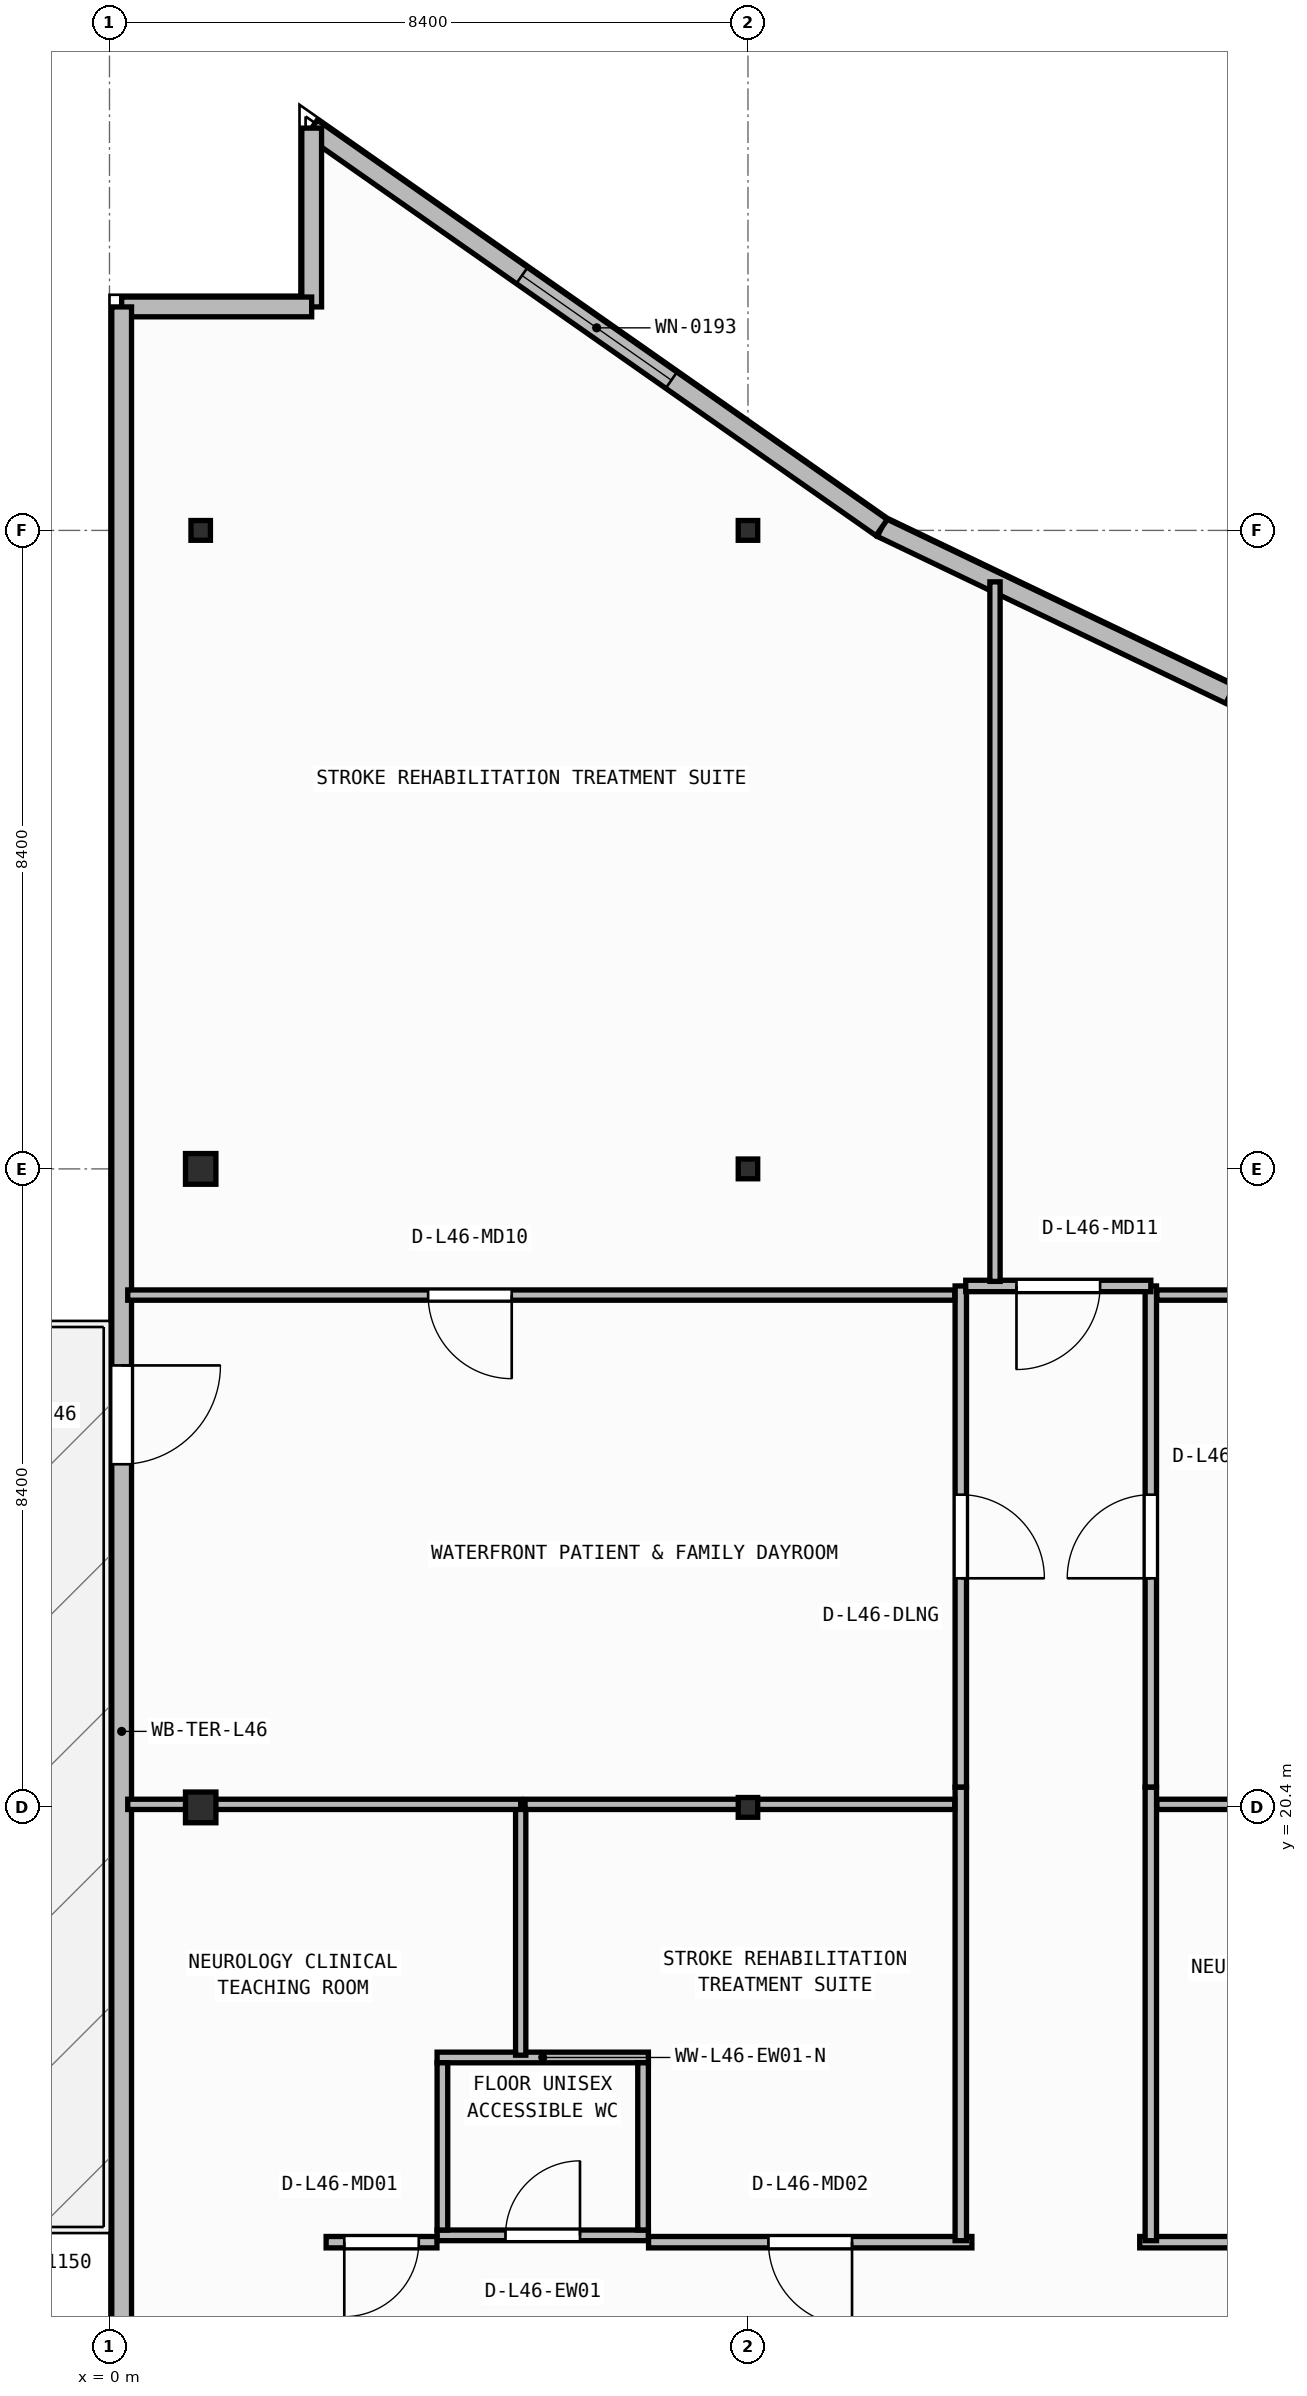
"""IFC4 building model, lengths in metres.
Left out: names, types, materials, properties, quantities, classifications, styles, units other than length and angle.
Written with IfcOpenShell. Run it as: python <this file> out.ifc"""

import sys

from ifc_helpers import new_model, si_unit, direction, frame, frame_2d, origin, origin_2d, place, context, subcontext, project, spatial, rectangle, i_section, extrude, element, fill, save


model = new_model("IFC4")
c1 = context("Model", 3, precision=1e-05, world=origin(), true_north=direction((0.0, 1.0)))
c2 = subcontext(c1, "Body", "Model", "MODEL_VIEW")
j1 = project(units=[si_unit("LENGTHUNIT", "METRE"), si_unit("PLANEANGLEUNIT", "RADIAN")], contexts=[c1])
p1 = place(None, origin())
s1 = spatial("IfcSite", under=j1, at=p1, CompositionType="ELEMENT")
p2 = place(p1, origin())
s2 = spatial("IfcBuilding", under=s1, at=p2, CompositionType="ELEMENT")
p3 = place(p2, frame((0.0, 0.0, 188.15)))
s3 = spatial("IfcBuildingStorey", under=s2, at=p3, CompositionType="ELEMENT", Elevation=188.15)
p4 = place(p3, frame((1.2, 20.4, 0.0), z_axis=(0.0, 0.0, 1.0), x_axis=(1.0, 0.0, 0.0)))
e1 = element("IfcColumn", 1, at=p4, inside=s3, PredefinedType="COLUMN", context=c2, shape_type="SweptSolid", body=[
    extrude(i_section(OverallWidth=0.4, OverallDepth=0.404, WebThickness=0.02, FlangeThickness=0.032, at=origin_2d()), origin(), (0.0, 0.0, 1.0), 3.95),
])
p5 = place(p3, frame((8.4, 20.4, 0.0), z_axis=(0.0, 0.0, 1.0), x_axis=(1.0, 0.0, 0.0)))
e2 = element("IfcColumn", 2, at=p5, inside=s3, PredefinedType="COLUMN", context=c2, shape_type="SweptSolid", body=[
    extrude(i_section(OverallWidth=0.256, OverallDepth=0.26, WebThickness=0.01, FlangeThickness=0.017, FilletRadius=0.013, at=origin_2d()), origin(), (0.0, 0.0, 1.0), 3.95),
])
p6 = place(p3, frame((1.2, 28.8, 0.0), z_axis=(0.0, 0.0, 1.0), x_axis=(1.0, 0.0, 0.0)))
e3 = element("IfcColumn", 3, at=p6, inside=s3, PredefinedType="COLUMN", context=c2, shape_type="SweptSolid", body=[
    extrude(i_section(OverallWidth=0.4, OverallDepth=0.404, WebThickness=0.02, FlangeThickness=0.032, at=origin_2d()), origin(), (0.0, 0.0, 1.0), 3.95),
])
for number, where, z_axis, x_axis in (
    (4, (8.4, 28.8, 0.0), (0.0, 0.0, 1.0), (1.0, 0.0, 0.0)),
    (5, (1.2, 37.2, 0.0), (0.0, 0.0, 1.0), (1.0, 0.0, 0.0)),
    (6, (8.4, 37.2, 0.0), (0.0, 0.0, 1.0), (1.0, 0.0, 0.0)),
):
    element("IfcColumn", number, at=place(p3, frame(where, z_axis=z_axis, x_axis=x_axis)), inside=s3, PredefinedType="COLUMN", context=c2, shape_type="SweptSolid", body=[
        extrude(i_section(OverallWidth=0.256, OverallDepth=0.26, WebThickness=0.01, FlangeThickness=0.017, FilletRadius=0.013, at=origin_2d()), origin(), (0.0, 0.0, 1.0), 3.95),
    ])
p7 = place(p3, frame((21.461, 31.823, 0.0), z_axis=(0.0, 0.0, 1.0), x_axis=(-0.901858094827, 0.432032379336, 0.0)))
e7 = element("IfcWall", 7, at=p7, inside=s3, PredefinedType="STANDARD", context=c2, shape_type="SweptSolid", body=[
    extrude(rectangle(XDim=12.532, YDim=0.26, at=frame_2d((6.266, 0.0))), origin(), (0.0, 0.0, 1.0), 3.71),
])
p8 = place(p7, frame((5.066, 0.0, 0.9)))
e8 = element("IfcOpeningElement", 8, at=p8, cuts=e7, PredefinedType="OPENING", context=c2, shape_type="SweptSolid", body=[
    extrude(rectangle(XDim=2.4, YDim=1.65, at=frame_2d((1.2, 0.825))), frame((0.0, 0.14, 0.0), z_axis=(0.0, -1.0, 0.0), x_axis=(1.0, 0.0, 0.0)), (0.0, 0.0, 1.0), 0.28),
])
p9 = place(p3, frame((10.159, 37.237, 0.0), z_axis=(0.0, 0.0, 1.0), x_axis=(-0.818933702389, 0.57388813465, 0.0)))
e9 = element("IfcWall", 9, at=p9, inside=s3, PredefinedType="STANDARD", context=c2, shape_type="SweptSolid", body=[
    extrude(rectangle(XDim=9.157, YDim=0.26, at=frame_2d((4.579, 0.0))), origin(), (0.0, 0.0, 1.0), 3.71),
])
p10 = place(p9, frame((3.378, 0.0, 0.9)))
e10 = element("IfcOpeningElement", 10, at=p10, cuts=e9, PredefinedType="OPENING", context=c2, shape_type="SweptSolid", body=[
    extrude(rectangle(XDim=2.4, YDim=1.65, at=frame_2d((1.2, 0.825))), frame((0.0, 0.14, 0.0), z_axis=(0.0, -1.0, 0.0), x_axis=(1.0, 0.0, 0.0)), (0.0, 0.0, 1.0), 0.28),
])
p11 = place(p3, frame((2.66, 42.492, 0.0), z_axis=(0.0, 0.0, 1.0), x_axis=(0.0, -1.0, 0.0)))
e11 = element("IfcWall", 11, at=p11, inside=s3, PredefinedType="STANDARD", context=c2, shape_type="SweptSolid", body=[
    extrude(rectangle(XDim=2.353, YDim=0.26, at=frame_2d((1.176, 0.0))), origin(), (0.0, 0.0, 1.0), 3.71),
])
p12 = place(p3, frame((2.66, 40.14, 0.0), z_axis=(0.0, 0.0, 1.0), x_axis=(-1.0, 0.0, 0.0)))
e12 = element("IfcWall", 12, at=p12, inside=s3, PredefinedType="STANDARD", context=c2, shape_type="SweptSolid", body=[
    extrude(rectangle(XDim=2.5, YDim=0.26, at=frame_2d((1.25, 0.0))), origin(), (0.0, 0.0, 1.0), 3.71),
])
p13 = place(p3, frame((0.16, 40.14, 0.0), z_axis=(0.0, 0.0, 1.0), x_axis=(0.0, -1.0, 0.0)))
e13 = element("IfcWall", 13, at=p13, inside=s3, PredefinedType="STANDARD", context=c2, shape_type="SweptSolid", body=[
    extrude(rectangle(XDim=37.48, YDim=0.26, at=frame_2d((18.74, 0.0))), origin(), (0.0, 0.0, 1.0), 3.71),
])
p14 = place(p13, frame((13.926, 0.0, 0.0)))
e14 = element("IfcOpeningElement", 14, at=p14, cuts=e13, PredefinedType="OPENING", context=c2, shape_type="SweptSolid", body=[
    extrude(rectangle(XDim=1.3, YDim=2.15, at=frame_2d((0.65, 1.075))), frame((0.0, 0.14, 0.0), z_axis=(0.0, -1.0, 0.0), x_axis=(1.0, 0.0, 0.0)), (0.0, 0.0, 1.0), 0.28),
])
p15 = place(p3, frame((4.31, 14.77, 0.0), z_axis=(0.0, 0.0, 1.0), x_axis=(1.0, 0.0, 0.0)))
e15 = element("IfcWall", 15, at=p15, inside=s3, PredefinedType="PARTITIONING", context=c2, shape_type="SweptSolid", body=[
    extrude(rectangle(XDim=2.78, YDim=0.14, at=frame_2d((1.39, 0.0))), origin(), (0.0, 0.0, 1.0), 3.71),
])
p16 = place(p15, frame((0.9, 0.0, 0.0)))
e16 = element("IfcOpeningElement", 16, at=p16, cuts=e15, PredefinedType="OPENING", context=c2, shape_type="SweptSolid", body=[
    extrude(rectangle(XDim=0.98, YDim=2.1, at=frame_2d((0.49, 1.05))), frame((0.0, 0.08, 0.0), z_axis=(0.0, -1.0, 0.0), x_axis=(1.0, 0.0, 0.0)), (0.0, 0.0, 1.0), 0.16),
])
p17 = place(p3, frame((4.31, 17.11, 0.0), z_axis=(0.0, 0.0, 1.0), x_axis=(1.0, 0.0, 0.0)))
e17 = element("IfcWall", 17, at=p17, inside=s3, PredefinedType="PARTITIONING", context=c2, shape_type="SweptSolid", body=[
    extrude(rectangle(XDim=2.78, YDim=0.14, at=frame_2d((1.39, 0.0))), origin(), (0.0, 0.0, 1.0), 3.71),
])
for number, where, z_axis, x_axis in (
    (18, (4.38, 14.84, 0.0), (0.0, 0.0, 1.0), (0.0, 1.0, 0.0)),
    (19, (7.02, 14.84, 0.0), (0.0, 0.0, 1.0), (0.0, 1.0, 0.0)),
):
    element("IfcWall", number, at=place(p3, frame(where, z_axis=z_axis, x_axis=x_axis)), inside=s3, PredefinedType="PARTITIONING", context=c2, shape_type="SweptSolid", body=[
        extrude(rectangle(XDim=2.2, YDim=0.14, at=frame_2d((1.1, 0.0))), origin(), (0.0, 0.0, 1.0), 3.71),
    ])
p18 = place(p3, frame((4.308, 14.68, 0.0), z_axis=(0.0, 0.0, 1.0), x_axis=(-1.0, 0.0, 0.0)))
e20 = element("IfcWall", 20, at=p18, inside=s3, PredefinedType="PARTITIONING", context=c2, shape_type="SweptSolid", body=[
    extrude(rectangle(XDim=1.458, YDim=0.15, at=frame_2d((0.729, 0.0))), origin(), (0.0, 0.0, 1.0), 3.71),
])
p19 = place(p18, frame((0.239, 0.0, 0.0)))
e21 = element("IfcOpeningElement", 21, at=p19, cuts=e20, PredefinedType="OPENING", context=c2, shape_type="SweptSolid", body=[
    extrude(rectangle(XDim=0.98, YDim=2.1, at=frame_2d((0.49, 1.05))), frame((0.0, 0.085, 0.0), z_axis=(0.0, -1.0, 0.0), x_axis=(1.0, 0.0, 0.0)), (0.0, 0.0, 1.0), 0.17),
])
p20 = place(p3, frame((11.346, 14.68, 0.0), z_axis=(0.0, 0.0, 1.0), x_axis=(-1.0, 0.0, 0.0)))
e22 = element("IfcWall", 22, at=p20, inside=s3, PredefinedType="PARTITIONING", context=c2, shape_type="SweptSolid", body=[
    extrude(rectangle(XDim=4.254, YDim=0.15, at=frame_2d((2.127, 0.0))), origin(), (0.0, 0.0, 1.0), 3.71),
])
p21 = place(p20, frame((1.577, 0.0, 0.0)))
e23 = element("IfcOpeningElement", 23, at=p21, cuts=e22, PredefinedType="OPENING", context=c2, shape_type="SweptSolid", body=[
    extrude(rectangle(XDim=1.1, YDim=2.1, at=frame_2d((0.55, 1.05))), frame((0.0, 0.085, 0.0), z_axis=(0.0, -1.0, 0.0), x_axis=(1.0, 0.0, 0.0)), (0.0, 0.0, 1.0), 0.17),
])
p22 = place(p3, frame((18.266, 14.68, 0.0), z_axis=(0.0, 0.0, 1.0), x_axis=(-1.0, 0.0, 0.0)))
e24 = element("IfcWall", 24, at=p22, inside=s3, PredefinedType="PARTITIONING", context=c2, shape_type="SweptSolid", body=[
    extrude(rectangle(XDim=4.712, YDim=0.15, at=frame_2d((2.356, 0.0))), origin(), (0.0, 0.0, 1.0), 3.71),
])
p23 = place(p22, frame((1.806, 0.0, 0.0)))
e25 = element("IfcOpeningElement", 25, at=p23, cuts=e24, PredefinedType="OPENING", context=c2, shape_type="SweptSolid", body=[
    extrude(rectangle(XDim=1.1, YDim=2.1, at=frame_2d((0.55, 1.05))), frame((0.0, 0.085, 0.0), z_axis=(0.0, -1.0, 0.0), x_axis=(1.0, 0.0, 0.0)), (0.0, 0.0, 1.0), 0.17),
])
for number, where, z_axis, x_axis in (
    (26, (11.2, 20.666, 0.0), (0.0, 0.0, 1.0), (0.0, -1.0, 0.0)),
    (27, (13.7, 14.7, 0.0), (0.0, 0.0, 1.0), (0.0, 1.0, 0.0)),
):
    element("IfcWall", number, at=place(p3, frame(where, z_axis=z_axis, x_axis=x_axis)), inside=s3, PredefinedType="PARTITIONING", context=c2, shape_type="SweptSolid", body=[
        extrude(rectangle(XDim=5.966, YDim=0.15, at=frame_2d((2.983, 0.0))), origin(), (0.0, 0.0, 1.0), 3.71),
    ])
p24 = place(p3, frame((11.2, 27.26, 0.0), z_axis=(0.0, 0.0, 1.0), x_axis=(0.0, -1.0, 0.0)))
e28 = element("IfcWall", 28, at=p24, inside=s3, PredefinedType="PARTITIONING", context=c2, shape_type="SweptSolid", body=[
    extrude(rectangle(XDim=6.592, YDim=0.15, at=frame_2d((3.296, 0.0))), origin(), (0.0, 0.0, 1.0), 3.71),
])
p25 = place(p24, frame((2.746, 0.0, 0.0)))
e29 = element("IfcOpeningElement", 29, at=p25, cuts=e28, PredefinedType="OPENING", context=c2, shape_type="SweptSolid", body=[
    extrude(rectangle(XDim=1.1, YDim=2.1, at=frame_2d((0.55, 1.05))), frame((0.0, 0.085, 0.0), z_axis=(0.0, -1.0, 0.0), x_axis=(1.0, 0.0, 0.0)), (0.0, 0.0, 1.0), 0.17),
])
p26 = place(p3, frame((13.7, 20.668, 0.0), z_axis=(0.0, 0.0, 1.0), x_axis=(0.0, 1.0, 0.0)))
e30 = element("IfcWall", 30, at=p26, inside=s3, PredefinedType="PARTITIONING", context=c2, shape_type="SweptSolid", body=[
    extrude(rectangle(XDim=6.592, YDim=0.15, at=frame_2d((3.296, 0.0))), origin(), (0.0, 0.0, 1.0), 3.71),
])
p27 = place(p26, frame((2.746, 0.0, 0.0)))
e31 = element("IfcOpeningElement", 31, at=p27, cuts=e30, PredefinedType="OPENING", context=c2, shape_type="SweptSolid", body=[
    extrude(rectangle(XDim=1.1, YDim=2.1, at=frame_2d((0.55, 1.05))), frame((0.0, 0.085, 0.0), z_axis=(0.0, -1.0, 0.0), x_axis=(1.0, 0.0, 0.0)), (0.0, 0.0, 1.0), 0.17),
])
p28 = place(p3, frame((13.7, 27.26, 0.0), z_axis=(0.0, 0.0, 1.0), x_axis=(-1.0, 0.0, 0.0)))
e32 = element("IfcWall", 32, at=p28, inside=s3, PredefinedType="PARTITIONING", context=c2, shape_type="SweptSolid", body=[
    extrude(rectangle(XDim=2.435, YDim=0.15, at=frame_2d((1.218, 0.0))), origin(), (0.0, 0.0, 1.0), 3.71),
])
p29 = place(p28, frame((0.667, 0.0, 0.0)))
e33 = element("IfcOpeningElement", 33, at=p29, cuts=e32, PredefinedType="OPENING", context=c2, shape_type="SweptSolid", body=[
    extrude(rectangle(XDim=1.1, YDim=2.1, at=frame_2d((0.55, 1.05))), frame((0.0, 0.085, 0.0), z_axis=(0.0, -1.0, 0.0), x_axis=(1.0, 0.0, 0.0)), (0.0, 0.0, 1.0), 0.17),
])
p30 = place(p3, frame((5.41, 17.14, 0.0), z_axis=(0.0, 0.0, 1.0), x_axis=(0.0, 1.0, 0.0)))
e34 = element("IfcWall", 34, at=p30, inside=s3, PredefinedType="PARTITIONING", context=c2, shape_type="SweptSolid", body=[
    extrude(rectangle(XDim=3.3, YDim=0.135, at=frame_2d((1.65, 0.0))), origin(), (0.0, 0.0, 1.0), 3.71),
])
p31 = place(p3, frame((5.41, 20.44, 0.0), z_axis=(0.0, 0.0, 1.0), x_axis=(-1.0, 0.0, 0.0)))
e35 = element("IfcWall", 35, at=p31, inside=s3, PredefinedType="PARTITIONING", context=c2, shape_type="SweptSolid", body=[
    extrude(rectangle(XDim=5.17, YDim=0.135, at=frame_2d((2.585, 0.0))), origin(), (0.0, 0.0, 1.0), 3.152),
])
p32 = place(p3, frame((11.12, 20.44, 0.0), z_axis=(0.0, 0.0, 1.0), x_axis=(-1.0, 0.0, 0.0)))
e36 = element("IfcWall", 36, at=p32, inside=s3, PredefinedType="PARTITIONING", context=c2, shape_type="SweptSolid", body=[
    extrude(rectangle(XDim=5.653, YDim=0.135, at=frame_2d((2.826, 0.0))), origin(), (0.0, 0.0, 1.0), 3.152),
])
p33 = place(p3, frame((18.04, 20.44, 0.0), z_axis=(0.0, 0.0, 1.0), x_axis=(-1.0, 0.0, 0.0)))
e37 = element("IfcWall", 37, at=p33, inside=s3, PredefinedType="PARTITIONING", context=c2, shape_type="SweptSolid", body=[
    extrude(rectangle(XDim=4.26, YDim=0.135, at=frame_2d((2.13, 0.0))), origin(), (0.0, 0.0, 1.0), 3.152),
])
p34 = place(p3, frame((11.12, 27.14, 0.0), z_axis=(0.0, 0.0, 1.0), x_axis=(-1.0, 0.0, 0.0)))
e38 = element("IfcWall", 38, at=p34, inside=s3, PredefinedType="PARTITIONING", context=c2, shape_type="SweptSolid", body=[
    extrude(rectangle(XDim=10.88, YDim=0.135, at=frame_2d((5.44, 0.0))), origin(), (0.0, 0.0, 1.0), 3.71),
])
p35 = place(p34, frame((5.828, 0.0, 0.0)))
e39 = element("IfcOpeningElement", 39, at=p35, cuts=e38, PredefinedType="OPENING", context=c2, shape_type="SweptSolid", body=[
    extrude(rectangle(XDim=1.1, YDim=2.1, at=frame_2d((0.55, 1.05))), frame((0.0, 0.077, 0.0), z_axis=(0.0, -1.0, 0.0), x_axis=(1.0, 0.0, 0.0)), (0.0, 0.0, 1.0), 0.155),
])
p36 = place(p3, frame((25.748, 27.14, 0.0), z_axis=(0.0, 0.0, 1.0), x_axis=(-1.0, 0.0, 0.0)))
e40 = element("IfcWall", 40, at=p36, inside=s3, PredefinedType="PARTITIONING", context=c2, shape_type="SweptSolid", body=[
    extrude(rectangle(XDim=11.968, YDim=0.135, at=frame_2d((5.984, 0.0))), origin(), (0.0, 0.0, 1.0), 3.71),
])
p37 = place(p3, frame((11.65, 27.32, 0.0), z_axis=(0.0, 0.0, 1.0), x_axis=(0.0, 1.0, 0.0)))
e41 = element("IfcWall", 41, at=p37, inside=s3, PredefinedType="PARTITIONING", context=c2, shape_type="SweptSolid", body=[
    extrude(rectangle(XDim=9.203, YDim=0.135, at=frame_2d((4.602, 0.0))), origin(), (0.0, 0.0, 1.0), 3.71),
])
p38 = place(p10, origin())
e42 = element("IfcWindow", 42, at=p38, inside=s3, PartitioningType="SINGLE_PANEL", PredefinedType="WINDOW", context=c2, shape_type="SweptSolid", body=[
    extrude(rectangle(XDim=2.4, YDim=1.65, at=frame_2d((1.2, 0.825))), frame((0.0, 0.03, 0.0), z_axis=(0.0, -1.0, 0.0), x_axis=(1.0, 0.0, 0.0)), (0.0, 0.0, 1.0), 0.06),
])
fill(e10, e42)
p39 = place(p14, origin())
e43 = element("IfcDoor", 43, at=p39, inside=s3, OperationType="SINGLE_SWING_LEFT", PredefinedType="DOOR", context=c2, shape_type="SweptSolid", body=[
    extrude(rectangle(XDim=1.3, YDim=2.15, at=frame_2d((0.65, 1.075))), frame((0.0, 0.025, 0.0), z_axis=(0.0, -1.0, 0.0), x_axis=(1.0, 0.0, 0.0)), (0.0, 0.0, 1.0), 0.05),
])
fill(e14, e43)
p40 = place(p16, origin())
e44 = element("IfcDoor", 44, at=p40, inside=s3, OperationType="SINGLE_SWING_RIGHT", PredefinedType="DOOR", context=c2, shape_type="SweptSolid", body=[
    extrude(rectangle(XDim=0.98, YDim=2.1, at=frame_2d((0.49, 1.05))), frame((0.0, 0.025, 0.0), z_axis=(0.0, -1.0, 0.0), x_axis=(1.0, 0.0, 0.0)), (0.0, 0.0, 1.0), 0.05),
])
fill(e16, e44)
p41 = place(p19, origin())
e45 = element("IfcDoor", 45, at=p41, inside=s3, OperationType="SINGLE_SWING_RIGHT", PredefinedType="DOOR", context=c2, shape_type="SweptSolid", body=[
    extrude(rectangle(XDim=0.98, YDim=2.1, at=frame_2d((0.49, 1.05))), frame((0.0, 0.025, 0.0), z_axis=(0.0, -1.0, 0.0), x_axis=(1.0, 0.0, 0.0)), (0.0, 0.0, 1.0), 0.05),
])
fill(e21, e45)
p42 = place(p21, origin())
e46 = element("IfcDoor", 46, at=p42, inside=s3, OperationType="SINGLE_SWING_LEFT", PredefinedType="DOOR", context=c2, shape_type="SweptSolid", body=[
    extrude(rectangle(XDim=1.1, YDim=2.1, at=frame_2d((0.55, 1.05))), frame((0.0, 0.025, 0.0), z_axis=(0.0, -1.0, 0.0), x_axis=(1.0, 0.0, 0.0)), (0.0, 0.0, 1.0), 0.05),
])
fill(e23, e46)
p43 = place(p25, origin())
e47 = element("IfcDoor", 47, at=p43, inside=s3, OperationType="SINGLE_SWING_RIGHT", PredefinedType="DOOR", context=c2, shape_type="SweptSolid", body=[
    extrude(rectangle(XDim=1.1, YDim=2.1, at=frame_2d((0.55, 1.05))), frame((0.0, 0.025, 0.0), z_axis=(0.0, -1.0, 0.0), x_axis=(1.0, 0.0, 0.0)), (0.0, 0.0, 1.0), 0.05),
])
fill(e29, e47)
p44 = place(p27, origin())
e48 = element("IfcDoor", 48, at=p44, inside=s3, OperationType="SINGLE_SWING_LEFT", PredefinedType="DOOR", context=c2, shape_type="SweptSolid", body=[
    extrude(rectangle(XDim=1.1, YDim=2.1, at=frame_2d((0.55, 1.05))), frame((0.0, 0.025, 0.0), z_axis=(0.0, -1.0, 0.0), x_axis=(1.0, 0.0, 0.0)), (0.0, 0.0, 1.0), 0.05),
])
fill(e31, e48)
p45 = place(p29, origin())
e49 = element("IfcDoor", 49, at=p45, inside=s3, OperationType="SINGLE_SWING_RIGHT", PredefinedType="DOOR", context=c2, shape_type="SweptSolid", body=[
    extrude(rectangle(XDim=1.1, YDim=2.1, at=frame_2d((0.55, 1.05))), frame((0.0, 0.025, 0.0), z_axis=(0.0, -1.0, 0.0), x_axis=(1.0, 0.0, 0.0)), (0.0, 0.0, 1.0), 0.05),
])
fill(e33, e49)
p46 = place(p35, origin())
e50 = element("IfcDoor", 50, at=p46, inside=s3, OperationType="SINGLE_SWING_LEFT", PredefinedType="DOOR", context=c2, shape_type="SweptSolid", body=[
    extrude(rectangle(XDim=1.1, YDim=2.1, at=frame_2d((0.55, 1.05))), frame((0.0, 0.025, 0.0), z_axis=(0.0, -1.0, 0.0), x_axis=(1.0, 0.0, 0.0)), (0.0, 0.0, 1.0), 0.05),
])
fill(e39, e50)
save(model, sys.argv[1])
